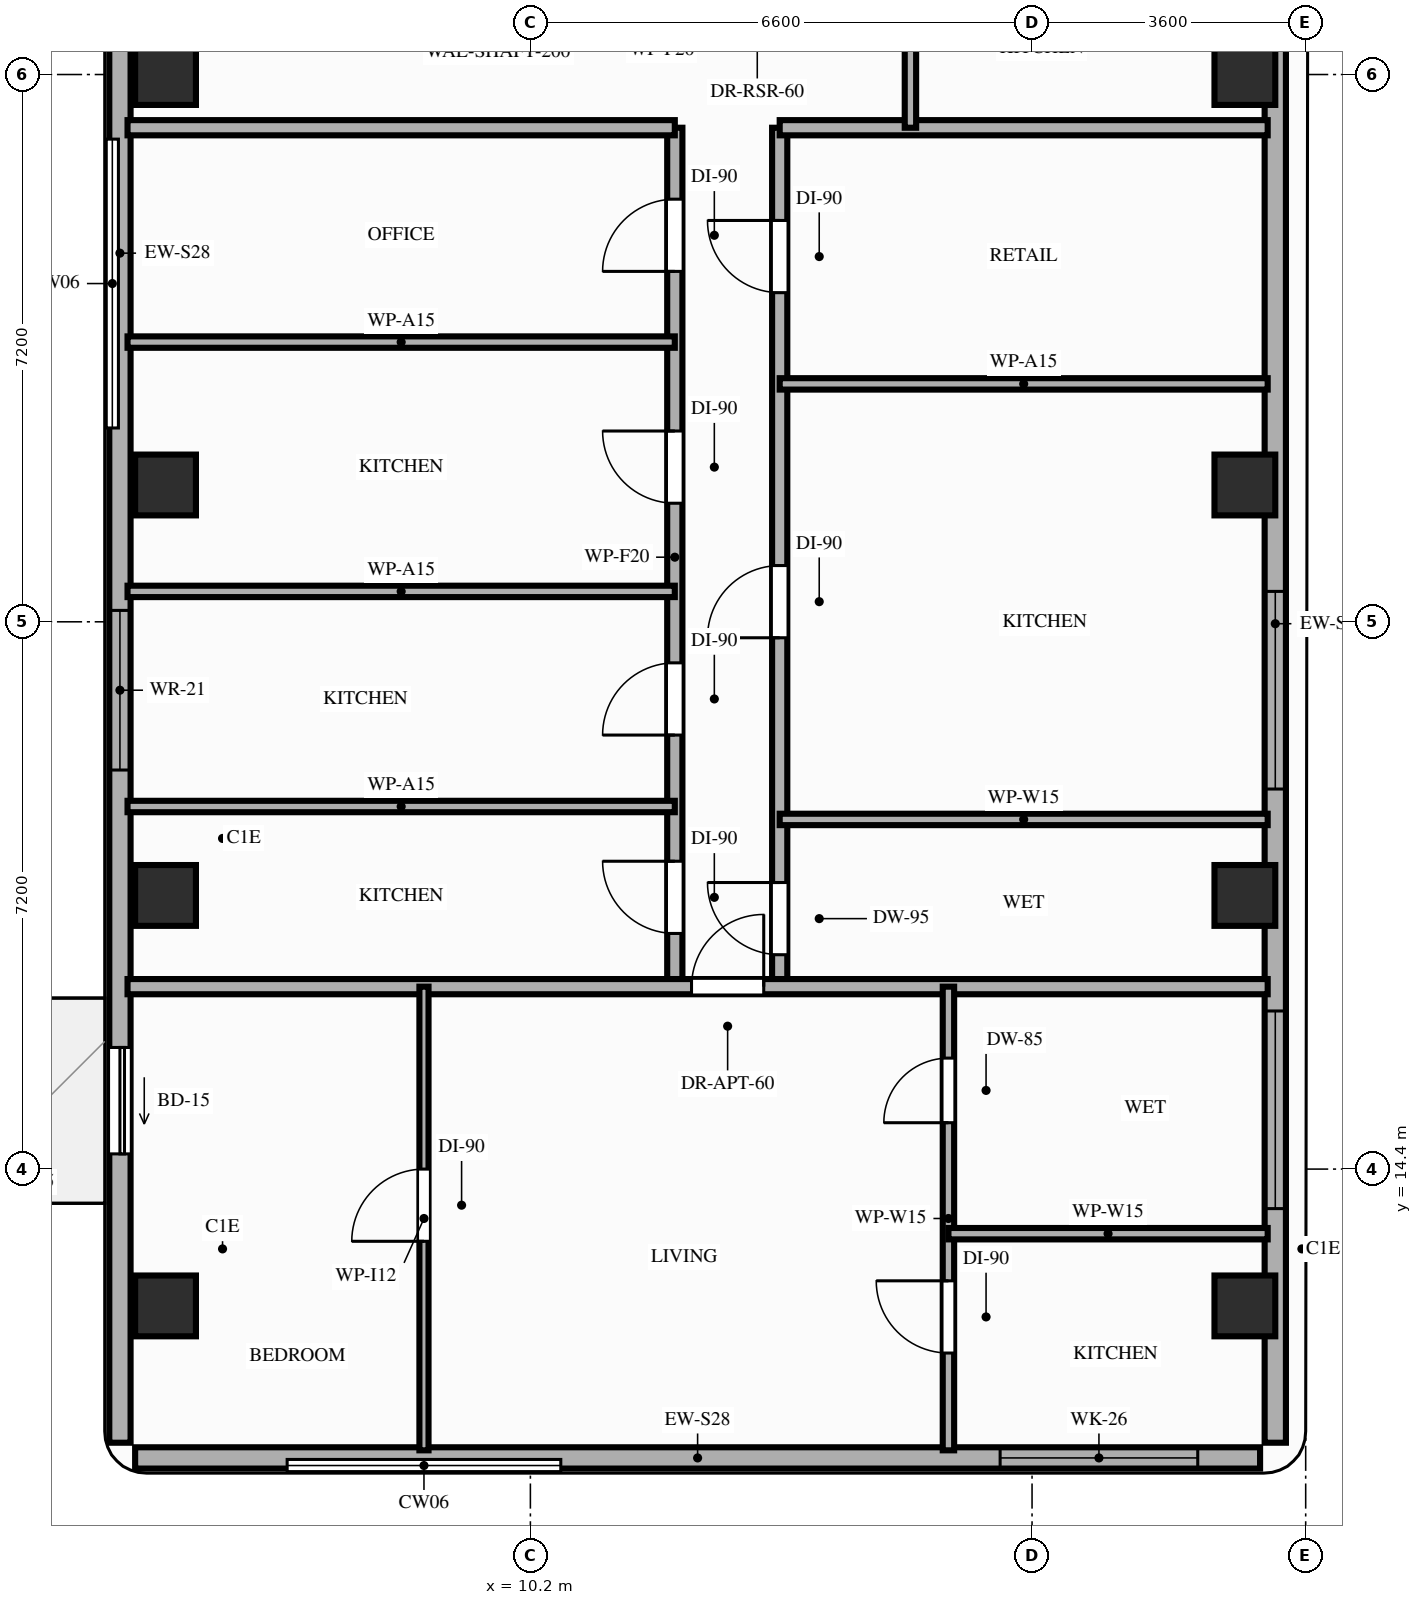
"""IFC4 building model, lengths in metres.
Left out: names, types, materials, properties, quantities, classifications, styles, units other than length and angle.
Written with IfcOpenShell. Run it as: python <this file> out.ifc"""

import sys

from ifc_helpers import new_model, si_unit, direction, frame, frame_2d, origin, origin_2d, place, context, subcontext, project, spatial, rectangle, extrude, element, fill, save


model = new_model("IFC4")
c1 = context("Model", 3, precision=1e-05, world=origin(), true_north=direction((0.0, 1.0)))
c2 = subcontext(c1, "Body", "Model", "MODEL_VIEW")
j1 = project(units=[si_unit("LENGTHUNIT", "METRE"), si_unit("PLANEANGLEUNIT", "RADIAN")], contexts=[c1])
p1 = place(None, origin())
s1 = spatial("IfcSite", under=j1, at=p1, CompositionType="ELEMENT")
p2 = place(p1, origin())
s2 = spatial("IfcBuilding", under=s1, at=p2, CompositionType="ELEMENT")
p3 = place(p2, frame((0.0, 0.0, 237.6)))
s3 = spatial("IfcBuildingStorey", under=s2, at=p3, CompositionType="ELEMENT", Elevation=237.6)
for number, where, z_axis, x_axis in (
    (1, (5.4, 12.6, 0.0), (0.0, 0.0, 1.0), (1.0, 0.0, 0.0)),
    (2, (19.6, 12.6, 0.0), (0.0, 0.0, 1.0), (1.0, 0.0, 0.0)),
    (3, (5.4, 18.0, 0.0), (0.0, 0.0, 1.0), (1.0, 0.0, 0.0)),
    (4, (19.6, 18.0, 0.0), (0.0, 0.0, 1.0), (1.0, 0.0, 0.0)),
    (5, (5.4, 23.4, 0.0), (0.0, 0.0, 1.0), (1.0, 0.0, 0.0)),
    (6, (19.6, 23.4, 0.0), (0.0, 0.0, 1.0), (1.0, 0.0, 0.0)),
    (7, (5.4, 28.8, 0.0), (0.0, 0.0, 1.0), (1.0, 0.0, 0.0)),
    (8, (19.6, 28.8, 0.0), (0.0, 0.0, 1.0), (1.0, 0.0, 0.0)),
):
    element("IfcColumn", number, at=place(p3, frame(where, z_axis=z_axis, x_axis=x_axis)), inside=s3, PredefinedType="COLUMN", context=c2, shape_type="SweptSolid", body=[
        extrude(rectangle(XDim=0.8, YDim=0.8, at=origin_2d()), origin(), (0.0, 0.0, 1.0), 3.2),
    ])
p4 = place(p3, frame((5.0, 10.6, 0.0), z_axis=(0.0, 0.0, 1.0), x_axis=(1.0, 0.0, 0.0)))
e9 = element("IfcWall", 9, at=p4, inside=s3, PredefinedType="STANDARD", context=c2, shape_type="SweptSolid", body=[
    extrude(rectangle(XDim=14.8, YDim=0.28, at=frame_2d((7.4, 0.0))), origin(), (0.0, 0.0, 1.0), 3.02),
])
p5 = place(p4, frame((11.38, 0.0, 0.85)))
e10 = element("IfcOpeningElement", 10, at=p5, cuts=e9, PredefinedType="OPENING", context=c2, shape_type="SweptSolid", body=[
    extrude(rectangle(XDim=2.6, YDim=1.92, at=frame_2d((1.3, 0.96))), frame((0.0, 0.15, 0.0), z_axis=(0.0, -1.0, 0.0), x_axis=(1.0, 0.0, 0.0)), (0.0, 0.0, 1.0), 0.3),
])
p6 = place(p3, frame((4.8, 42.1, 0.0), z_axis=(0.0, 0.0, 1.0), x_axis=(0.0, -1.0, 0.0)))
e11 = element("IfcWall", 11, at=p6, inside=s3, PredefinedType="STANDARD", context=c2, shape_type="SweptSolid", body=[
    extrude(rectangle(XDim=31.3, YDim=0.28, at=frame_2d((15.65, 0.0))), origin(), (0.0, 0.0, 1.0), 2.71),
])
p7 = place(p6, frame((26.1, 0.0, 0.0)))
e12 = element("IfcOpeningElement", 12, at=p7, cuts=e11, PredefinedType="OPENING", context=c2, shape_type="SweptSolid", body=[
    extrude(rectangle(XDim=1.4, YDim=2.1, at=frame_2d((0.7, 1.05))), frame((0.0, 0.15, 0.0), z_axis=(0.0, -1.0, 0.0), x_axis=(1.0, 0.0, 0.0)), (0.0, 0.0, 1.0), 0.3),
])
p8 = place(p6, frame((20.35, 0.0, 0.85)))
e13 = element("IfcOpeningElement", 13, at=p8, cuts=e11, PredefinedType="OPENING", context=c2, shape_type="SweptSolid", body=[
    extrude(rectangle(XDim=2.1, YDim=1.61, at=frame_2d((1.05, 0.805))), frame((0.0, 0.15, 0.0), z_axis=(0.0, -1.0, 0.0), x_axis=(1.0, 0.0, 0.0)), (0.0, 0.0, 1.0), 0.3),
])
p9 = place(p6, frame((9.5, 0.0, 0.85)))
e14 = element("IfcOpeningElement", 14, at=p9, cuts=e11, PredefinedType="OPENING", context=c2, shape_type="SweptSolid", body=[
    extrude(rectangle(XDim=2.6, YDim=1.61, at=frame_2d((1.3, 0.805))), frame((0.0, 0.15, 0.0), z_axis=(0.0, -1.0, 0.0), x_axis=(1.0, 0.0, 0.0)), (0.0, 0.0, 1.0), 0.3),
])
p10 = place(p6, frame((3.4, 0.0, 0.85)))
e15 = element("IfcOpeningElement", 15, at=p10, cuts=e11, PredefinedType="OPENING", context=c2, shape_type="SweptSolid", body=[
    extrude(rectangle(XDim=2.6, YDim=1.61, at=frame_2d((1.3, 0.805))), frame((0.0, 0.15, 0.0), z_axis=(0.0, -1.0, 0.0), x_axis=(1.0, 0.0, 0.0)), (0.0, 0.0, 1.0), 0.3),
])
p11 = place(p3, frame((20.0, 10.8, 0.0), z_axis=(0.0, 0.0, 1.0), x_axis=(0.0, 1.0, 0.0)))
e16 = element("IfcWall", 16, at=p11, inside=s3, PredefinedType="STANDARD", context=c2, shape_type="SweptSolid", body=[
    extrude(rectangle(XDim=21.55, YDim=0.28, at=frame_2d((10.775, 0.0))), origin(), (0.0, 0.0, 1.0), 2.56),
])
p12 = place(p11, frame((3.08, 0.0, 0.85)))
e17 = element("IfcOpeningElement", 17, at=p12, cuts=e16, PredefinedType="OPENING", context=c2, shape_type="SweptSolid", body=[
    extrude(rectangle(XDim=2.6, YDim=1.46, at=frame_2d((1.3, 0.73))), frame((0.0, 0.15, 0.0), z_axis=(0.0, -1.0, 0.0), x_axis=(1.0, 0.0, 0.0)), (0.0, 0.0, 1.0), 0.3),
])
p13 = place(p11, frame((8.6, 0.0, 0.85)))
e18 = element("IfcOpeningElement", 18, at=p13, cuts=e16, PredefinedType="OPENING", context=c2, shape_type="SweptSolid", body=[
    extrude(rectangle(XDim=2.6, YDim=1.46, at=frame_2d((1.3, 0.73))), frame((0.0, 0.15, 0.0), z_axis=(0.0, -1.0, 0.0), x_axis=(1.0, 0.0, 0.0)), (0.0, 0.0, 1.0), 0.3),
])
p14 = place(p3, frame((12.1, 16.8, 0.0), z_axis=(0.0, 0.0, 1.0), x_axis=(0.0, 1.0, 0.0)))
e19 = element("IfcWall", 19, at=p14, inside=s3, PredefinedType="PARTITIONING", context=c2, shape_type="SweptSolid", body=[
    extrude(rectangle(XDim=11.3, YDim=0.2, at=frame_2d((5.65, 0.0))), origin(), (0.0, 0.0, 1.0), 2.56),
])
p15 = place(p14, frame((0.7, 0.0, 0.0)))
e20 = element("IfcOpeningElement", 20, at=p15, cuts=e19, PredefinedType="OPENING", context=c2, shape_type="SweptSolid", body=[
    extrude(rectangle(XDim=0.95, YDim=2.15, at=frame_2d((0.475, 1.075))), frame((0.0, 0.11, 0.0), z_axis=(0.0, -1.0, 0.0), x_axis=(1.0, 0.0, 0.0)), (0.0, 0.0, 1.0), 0.22),
])
p16 = place(p14, frame((3.31, 0.0, 0.0)))
e21 = element("IfcOpeningElement", 21, at=p16, cuts=e19, PredefinedType="OPENING", context=c2, shape_type="SweptSolid", body=[
    extrude(rectangle(XDim=0.95, YDim=2.15, at=frame_2d((0.475, 1.075))), frame((0.0, 0.11, 0.0), z_axis=(0.0, -1.0, 0.0), x_axis=(1.0, 0.0, 0.0)), (0.0, 0.0, 1.0), 0.22),
])
p17 = place(p14, frame((6.36, 0.0, 0.0)))
e22 = element("IfcOpeningElement", 22, at=p17, cuts=e19, PredefinedType="OPENING", context=c2, shape_type="SweptSolid", body=[
    extrude(rectangle(XDim=0.95, YDim=2.15, at=frame_2d((0.475, 1.075))), frame((0.0, 0.11, 0.0), z_axis=(0.0, -1.0, 0.0), x_axis=(1.0, 0.0, 0.0)), (0.0, 0.0, 1.0), 0.22),
])
p18 = place(p14, frame((9.41, 0.0, 0.0)))
e23 = element("IfcOpeningElement", 23, at=p18, cuts=e19, PredefinedType="OPENING", context=c2, shape_type="SweptSolid", body=[
    extrude(rectangle(XDim=0.95, YDim=2.15, at=frame_2d((0.475, 1.075))), frame((0.0, 0.11, 0.0), z_axis=(0.0, -1.0, 0.0), x_axis=(1.0, 0.0, 0.0)), (0.0, 0.0, 1.0), 0.22),
])
p19 = place(p3, frame((13.48, 16.8, 0.0), z_axis=(0.0, 0.0, 1.0), x_axis=(0.0, 1.0, 0.0)))
e24 = element("IfcWall", 24, at=p19, inside=s3, PredefinedType="PARTITIONING", context=c2, shape_type="SweptSolid", body=[
    extrude(rectangle(XDim=11.3, YDim=0.2, at=frame_2d((5.65, 0.0))), origin(), (0.0, 0.0, 1.0), 2.56),
])
p20 = place(p19, frame((0.42, 0.0, 0.0)))
e25 = element("IfcOpeningElement", 25, at=p20, cuts=e24, PredefinedType="OPENING", context=c2, shape_type="SweptSolid", body=[
    extrude(rectangle(XDim=0.95, YDim=2.1, at=frame_2d((0.475, 1.05))), frame((0.0, 0.11, 0.0), z_axis=(0.0, -1.0, 0.0), x_axis=(1.0, 0.0, 0.0)), (0.0, 0.0, 1.0), 0.22),
])
p21 = place(p19, frame((4.59, 0.0, 0.0)))
e26 = element("IfcOpeningElement", 26, at=p21, cuts=e24, PredefinedType="OPENING", context=c2, shape_type="SweptSolid", body=[
    extrude(rectangle(XDim=0.95, YDim=2.15, at=frame_2d((0.475, 1.075))), frame((0.0, 0.11, 0.0), z_axis=(0.0, -1.0, 0.0), x_axis=(1.0, 0.0, 0.0)), (0.0, 0.0, 1.0), 0.22),
])
p22 = place(p19, frame((9.13, 0.0, 0.0)))
e27 = element("IfcOpeningElement", 27, at=p22, cuts=e24, PredefinedType="OPENING", context=c2, shape_type="SweptSolid", body=[
    extrude(rectangle(XDim=0.95, YDim=2.15, at=frame_2d((0.475, 1.075))), frame((0.0, 0.11, 0.0), z_axis=(0.0, -1.0, 0.0), x_axis=(1.0, 0.0, 0.0)), (0.0, 0.0, 1.0), 0.22),
])
p23 = place(p3, frame((4.9, 16.8, 0.0), z_axis=(0.0, 0.0, 1.0), x_axis=(1.0, 0.0, 0.0)))
e28 = element("IfcWall", 28, at=p23, inside=s3, PredefinedType="PARTITIONING", context=c2, shape_type="SweptSolid", body=[
    extrude(rectangle(XDim=15.0, YDim=0.2, at=frame_2d((7.5, 0.0))), origin(), (0.0, 0.0, 1.0), 2.56),
])
p24 = place(p23, frame((7.42, 0.0, 0.0)))
e29 = element("IfcOpeningElement", 29, at=p24, cuts=e28, PredefinedType="OPENING", context=c2, shape_type="SweptSolid", body=[
    extrude(rectangle(XDim=0.95, YDim=2.15, at=frame_2d((0.475, 1.075))), frame((0.0, 0.11, 0.0), z_axis=(0.0, -1.0, 0.0), x_axis=(1.0, 0.0, 0.0)), (0.0, 0.0, 1.0), 0.22),
])
p25 = place(p3, frame((4.9, 28.1, 0.0), z_axis=(0.0, 0.0, 1.0), x_axis=(1.0, 0.0, 0.0)))
e30 = element("IfcWall", 30, at=p25, inside=s3, PredefinedType="PARTITIONING", context=c2, shape_type="SweptSolid", body=[
    extrude(rectangle(XDim=7.2, YDim=0.2, at=frame_2d((3.6, 0.0))), origin(), (0.0, 0.0, 1.0), 2.56),
])
p26 = place(p3, frame((13.48, 28.1, 0.0), z_axis=(0.0, 0.0, 1.0), x_axis=(1.0, 0.0, 0.0)))
e31 = element("IfcWall", 31, at=p26, inside=s3, PredefinedType="PARTITIONING", context=c2, shape_type="SweptSolid", body=[
    extrude(rectangle(XDim=6.42, YDim=0.2, at=frame_2d((3.21, 0.0))), origin(), (0.0, 0.0, 1.0), 2.56),
])
p27 = place(p3, frame((15.2, 28.1, 0.0), z_axis=(0.0, 0.0, 1.0), x_axis=(0.0, 1.0, 0.0)))
e32 = element("IfcWall", 32, at=p27, inside=s3, PredefinedType="PARTITIONING", context=c2, shape_type="SweptSolid", body=[
    extrude(rectangle(XDim=3.05, YDim=0.15, at=frame_2d((1.525, 0.0))), origin(), (0.0, 0.0, 1.0), 2.56),
])
p28 = place(p3, frame((8.8, 10.7, 0.0), z_axis=(0.0, 0.0, 1.0), x_axis=(0.0, 1.0, 0.0)))
e33 = element("IfcWall", 33, at=p28, inside=s3, PredefinedType="PARTITIONING", context=c2, shape_type="SweptSolid", body=[
    extrude(rectangle(XDim=6.1, YDim=0.12, at=frame_2d((3.05, 0.0))), origin(), (0.0, 0.0, 1.0), 2.56),
])
p29 = place(p28, frame((2.75, 0.0, 0.0)))
e34 = element("IfcOpeningElement", 34, at=p29, cuts=e33, PredefinedType="OPENING", context=c2, shape_type="SweptSolid", body=[
    extrude(rectangle(XDim=0.95, YDim=2.15, at=frame_2d((0.475, 1.075))), frame((0.0, 0.07, 0.0), z_axis=(0.0, -1.0, 0.0), x_axis=(1.0, 0.0, 0.0)), (0.0, 0.0, 1.0), 0.14),
])
p30 = place(p3, frame((15.7, 10.7, 0.0), z_axis=(0.0, 0.0, 1.0), x_axis=(0.0, 1.0, 0.0)))
e35 = element("IfcWall", 35, at=p30, inside=s3, PredefinedType="PARTITIONING", context=c2, shape_type="SweptSolid", body=[
    extrude(rectangle(XDim=6.1, YDim=0.15, at=frame_2d((3.05, 0.0))), origin(), (0.0, 0.0, 1.0), 2.56),
])
p31 = place(p30, frame((1.28, 0.0, 0.0)))
e36 = element("IfcOpeningElement", 36, at=p31, cuts=e35, PredefinedType="OPENING", context=c2, shape_type="SweptSolid", body=[
    extrude(rectangle(XDim=0.95, YDim=2.15, at=frame_2d((0.475, 1.075))), frame((0.0, 0.085, 0.0), z_axis=(0.0, -1.0, 0.0), x_axis=(1.0, 0.0, 0.0)), (0.0, 0.0, 1.0), 0.17),
])
p32 = place(p30, frame((4.31, 0.0, 0.0)))
e37 = element("IfcOpeningElement", 37, at=p32, cuts=e35, PredefinedType="OPENING", context=c2, shape_type="SweptSolid", body=[
    extrude(rectangle(XDim=0.85, YDim=2.1, at=frame_2d((0.425, 1.05))), frame((0.0, 0.085, 0.0), z_axis=(0.0, -1.0, 0.0), x_axis=(1.0, 0.0, 0.0)), (0.0, 0.0, 1.0), 0.17),
])
p33 = place(p3, frame((15.7, 13.55, 0.0), z_axis=(0.0, 0.0, 1.0), x_axis=(1.0, 0.0, 0.0)))
e38 = element("IfcWall", 38, at=p33, inside=s3, PredefinedType="PARTITIONING", context=c2, shape_type="SweptSolid", body=[
    extrude(rectangle(XDim=4.2, YDim=0.15, at=frame_2d((2.1, 0.0))), origin(), (0.0, 0.0, 1.0), 2.56),
])
for number, where, z_axis, x_axis in (
    (39, (4.9, 19.17, 0.0), (0.0, 0.0, 1.0), (1.0, 0.0, 0.0)),
    (40, (4.9, 22.0, 0.0), (0.0, 0.0, 1.0), (1.0, 0.0, 0.0)),
    (41, (4.9, 25.28, 0.0), (0.0, 0.0, 1.0), (1.0, 0.0, 0.0)),
):
    element("IfcWall", number, at=place(p3, frame(where, z_axis=z_axis, x_axis=x_axis)), inside=s3, PredefinedType="PARTITIONING", context=c2, shape_type="SweptSolid", body=[
        extrude(rectangle(XDim=7.2, YDim=0.15, at=frame_2d((3.6, 0.0))), origin(), (0.0, 0.0, 1.0), 2.56),
    ])
for number, where, z_axis, x_axis in (
    (42, (13.48, 19.0, 0.0), (0.0, 0.0, 1.0), (1.0, 0.0, 0.0)),
    (43, (13.48, 24.73, 0.0), (0.0, 0.0, 1.0), (1.0, 0.0, 0.0)),
):
    element("IfcWall", number, at=place(p3, frame(where, z_axis=z_axis, x_axis=x_axis)), inside=s3, PredefinedType="PARTITIONING", context=c2, shape_type="SweptSolid", body=[
        extrude(rectangle(XDim=6.42, YDim=0.15, at=frame_2d((3.21, 0.0))), origin(), (0.0, 0.0, 1.0), 2.56),
    ])
p34 = place(p7, origin())
e44 = element("IfcDoor", 44, at=p34, inside=s3, OperationType="SLIDING_TO_RIGHT", PredefinedType="DOOR", context=c2, shape_type="SweptSolid", body=[
    extrude(rectangle(XDim=1.4, YDim=2.1, at=frame_2d((0.7, 1.05))), frame((0.0, 0.025, 0.0), z_axis=(0.0, -1.0, 0.0), x_axis=(1.0, 0.0, 0.0)), (0.0, 0.0, 1.0), 0.05),
])
fill(e12, e44)
p35 = place(p5, origin())
e45 = element("IfcWindow", 45, at=p35, inside=s3, PartitioningType="SINGLE_PANEL", PredefinedType="WINDOW", context=c2, shape_type="SweptSolid", body=[
    extrude(rectangle(XDim=2.6, YDim=1.92, at=frame_2d((1.3, 0.96))), frame((0.0, 0.03, 0.0), z_axis=(0.0, -1.0, 0.0), x_axis=(1.0, 0.0, 0.0)), (0.0, 0.0, 1.0), 0.06),
])
fill(e10, e45)
p36 = place(p12, origin())
e46 = element("IfcWindow", 46, at=p36, inside=s3, PartitioningType="SINGLE_PANEL", PredefinedType="WINDOW", context=c2, shape_type="SweptSolid", body=[
    extrude(rectangle(XDim=2.6, YDim=1.46, at=frame_2d((1.3, 0.73))), frame((0.0, 0.03, 0.0), z_axis=(0.0, -1.0, 0.0), x_axis=(1.0, 0.0, 0.0)), (0.0, 0.0, 1.0), 0.06),
])
fill(e17, e46)
p37 = place(p8, origin())
e47 = element("IfcWindow", 47, at=p37, inside=s3, PartitioningType="SINGLE_PANEL", PredefinedType="WINDOW", context=c2, shape_type="SweptSolid", body=[
    extrude(rectangle(XDim=2.1, YDim=1.61, at=frame_2d((1.05, 0.805))), frame((0.0, 0.03, 0.0), z_axis=(0.0, -1.0, 0.0), x_axis=(1.0, 0.0, 0.0)), (0.0, 0.0, 1.0), 0.06),
])
fill(e13, e47)
p38 = place(p13, origin())
e48 = element("IfcWindow", 48, at=p38, inside=s3, PartitioningType="SINGLE_PANEL", PredefinedType="WINDOW", context=c2, shape_type="SweptSolid", body=[
    extrude(rectangle(XDim=2.6, YDim=1.46, at=frame_2d((1.3, 0.73))), frame((0.0, 0.03, 0.0), z_axis=(0.0, -1.0, 0.0), x_axis=(1.0, 0.0, 0.0)), (0.0, 0.0, 1.0), 0.06),
])
fill(e18, e48)
p39 = place(p24, origin())
e49 = element("IfcDoor", 49, at=p39, inside=s3, OperationType="SINGLE_SWING_RIGHT", PredefinedType="DOOR", context=c2, shape_type="SweptSolid", body=[
    extrude(rectangle(XDim=0.95, YDim=2.15, at=frame_2d((0.475, 1.075))), frame((0.0, 0.025, 0.0), z_axis=(0.0, -1.0, 0.0), x_axis=(1.0, 0.0, 0.0)), (0.0, 0.0, 1.0), 0.05),
])
fill(e29, e49)
p40 = place(p29, origin())
e50 = element("IfcDoor", 50, at=p40, inside=s3, OperationType="SINGLE_SWING_LEFT", PredefinedType="DOOR", context=c2, shape_type="SweptSolid", body=[
    extrude(rectangle(XDim=0.95, YDim=2.15, at=frame_2d((0.475, 1.075))), frame((0.0, 0.025, 0.0), z_axis=(0.0, -1.0, 0.0), x_axis=(1.0, 0.0, 0.0)), (0.0, 0.0, 1.0), 0.05),
])
fill(e34, e50)
p41 = place(p31, origin())
e51 = element("IfcDoor", 51, at=p41, inside=s3, OperationType="SINGLE_SWING_RIGHT", PredefinedType="DOOR", context=c2, shape_type="SweptSolid", body=[
    extrude(rectangle(XDim=0.95, YDim=2.15, at=frame_2d((0.475, 1.075))), frame((0.0, 0.025, 0.0), z_axis=(0.0, -1.0, 0.0), x_axis=(1.0, 0.0, 0.0)), (0.0, 0.0, 1.0), 0.05),
])
fill(e36, e51)
p42 = place(p32, origin())
e52 = element("IfcDoor", 52, at=p42, inside=s3, OperationType="SINGLE_SWING_LEFT", PredefinedType="DOOR", context=c2, shape_type="SweptSolid", body=[
    extrude(rectangle(XDim=0.85, YDim=2.1, at=frame_2d((0.425, 1.05))), frame((0.0, 0.025, 0.0), z_axis=(0.0, -1.0, 0.0), x_axis=(1.0, 0.0, 0.0)), (0.0, 0.0, 1.0), 0.05),
])
fill(e37, e52)
p43 = place(p15, origin())
e53 = element("IfcDoor", 53, at=p43, inside=s3, OperationType="SINGLE_SWING_RIGHT", PredefinedType="DOOR", context=c2, shape_type="SweptSolid", body=[
    extrude(rectangle(XDim=0.95, YDim=2.15, at=frame_2d((0.475, 1.075))), frame((0.0, 0.025, 0.0), z_axis=(0.0, -1.0, 0.0), x_axis=(1.0, 0.0, 0.0)), (0.0, 0.0, 1.0), 0.05),
])
fill(e20, e53)
p44 = place(p16, origin())
e54 = element("IfcDoor", 54, at=p44, inside=s3, OperationType="SINGLE_SWING_LEFT", PredefinedType="DOOR", context=c2, shape_type="SweptSolid", body=[
    extrude(rectangle(XDim=0.95, YDim=2.15, at=frame_2d((0.475, 1.075))), frame((0.0, 0.025, 0.0), z_axis=(0.0, -1.0, 0.0), x_axis=(1.0, 0.0, 0.0)), (0.0, 0.0, 1.0), 0.05),
])
fill(e21, e54)
p45 = place(p17, origin())
e55 = element("IfcDoor", 55, at=p45, inside=s3, OperationType="SINGLE_SWING_RIGHT", PredefinedType="DOOR", context=c2, shape_type="SweptSolid", body=[
    extrude(rectangle(XDim=0.95, YDim=2.15, at=frame_2d((0.475, 1.075))), frame((0.0, 0.025, 0.0), z_axis=(0.0, -1.0, 0.0), x_axis=(1.0, 0.0, 0.0)), (0.0, 0.0, 1.0), 0.05),
])
fill(e22, e55)
p46 = place(p18, origin())
e56 = element("IfcDoor", 56, at=p46, inside=s3, OperationType="SINGLE_SWING_LEFT", PredefinedType="DOOR", context=c2, shape_type="SweptSolid", body=[
    extrude(rectangle(XDim=0.95, YDim=2.15, at=frame_2d((0.475, 1.075))), frame((0.0, 0.025, 0.0), z_axis=(0.0, -1.0, 0.0), x_axis=(1.0, 0.0, 0.0)), (0.0, 0.0, 1.0), 0.05),
])
fill(e23, e56)
p47 = place(p20, origin())
e57 = element("IfcDoor", 57, at=p47, inside=s3, OperationType="SINGLE_SWING_RIGHT", PredefinedType="DOOR", context=c2, shape_type="SweptSolid", body=[
    extrude(rectangle(XDim=0.95, YDim=2.1, at=frame_2d((0.475, 1.05))), frame((0.0, 0.025, 0.0), z_axis=(0.0, -1.0, 0.0), x_axis=(1.0, 0.0, 0.0)), (0.0, 0.0, 1.0), 0.05),
])
fill(e25, e57)
p48 = place(p21, origin())
e58 = element("IfcDoor", 58, at=p48, inside=s3, OperationType="SINGLE_SWING_LEFT", PredefinedType="DOOR", context=c2, shape_type="SweptSolid", body=[
    extrude(rectangle(XDim=0.95, YDim=2.15, at=frame_2d((0.475, 1.075))), frame((0.0, 0.025, 0.0), z_axis=(0.0, -1.0, 0.0), x_axis=(1.0, 0.0, 0.0)), (0.0, 0.0, 1.0), 0.05),
])
fill(e26, e58)
p49 = place(p22, origin())
e59 = element("IfcDoor", 59, at=p49, inside=s3, OperationType="SINGLE_SWING_RIGHT", PredefinedType="DOOR", context=c2, shape_type="SweptSolid", body=[
    extrude(rectangle(XDim=0.95, YDim=2.15, at=frame_2d((0.475, 1.075))), frame((0.0, 0.025, 0.0), z_axis=(0.0, -1.0, 0.0), x_axis=(1.0, 0.0, 0.0)), (0.0, 0.0, 1.0), 0.05),
])
fill(e27, e59)
save(model, sys.argv[1])
